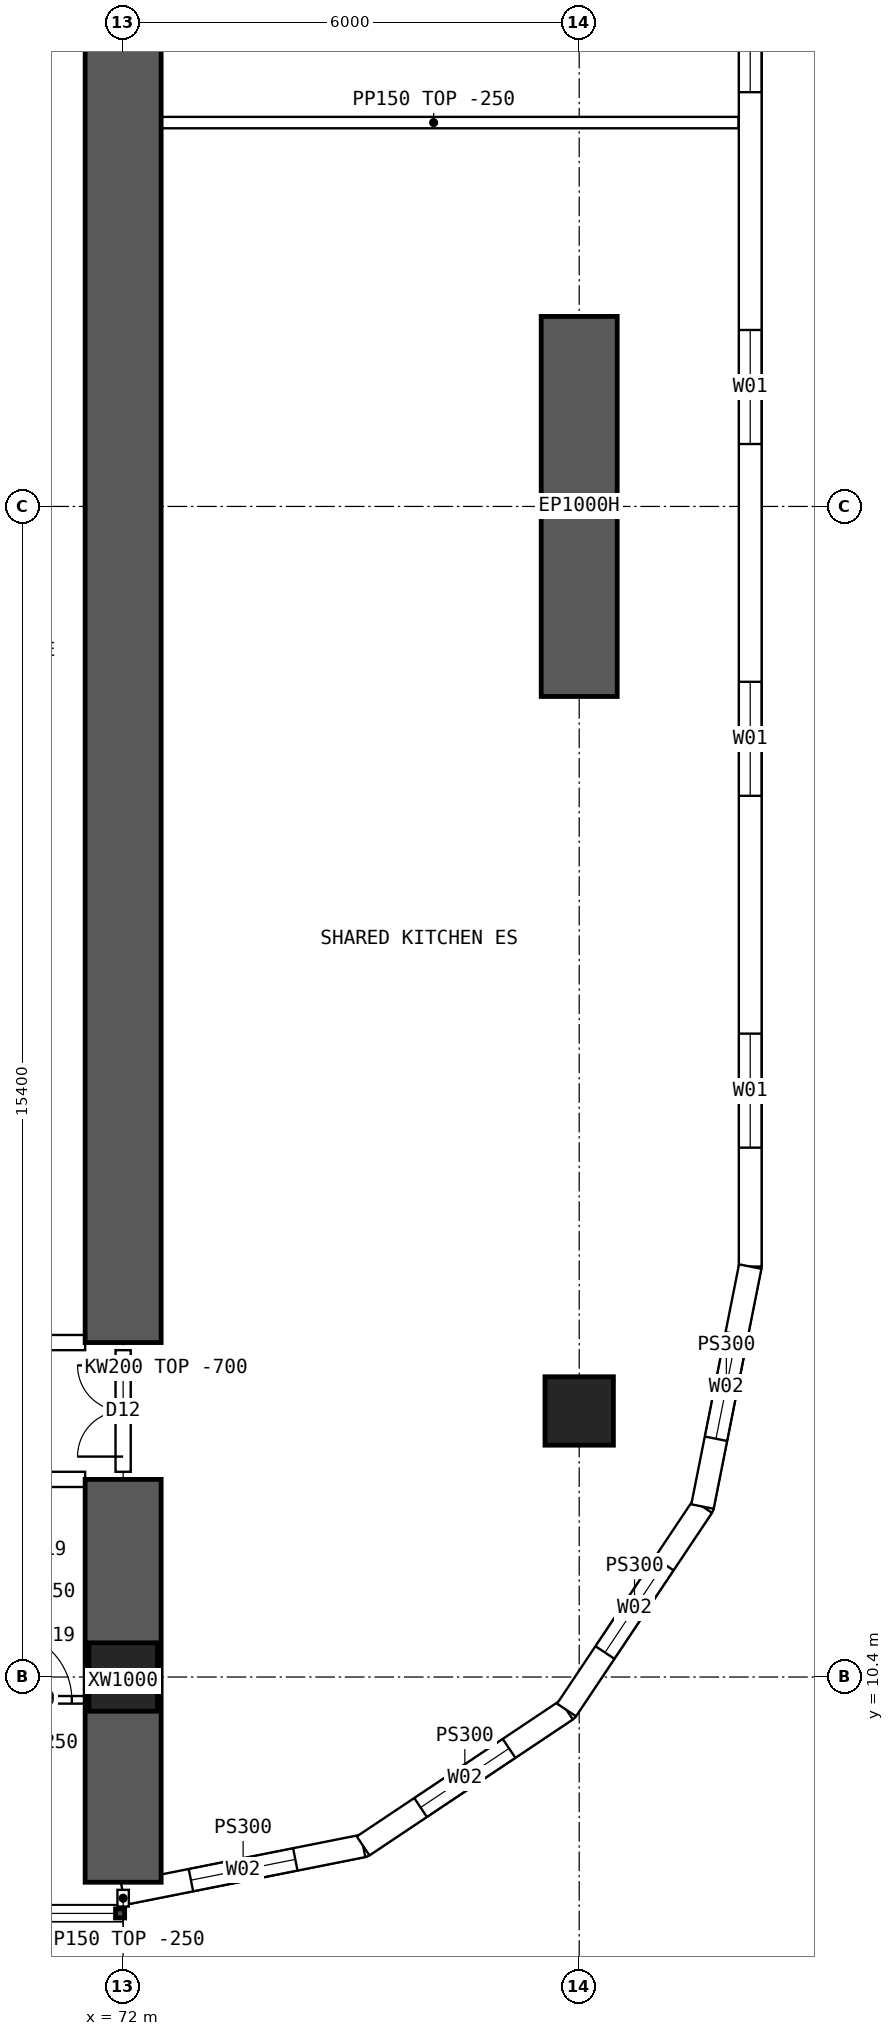
"""IFC4 building model, lengths in metres.
Left out: names, types, materials, properties, quantities, classifications, styles, units other than length and angle.
Written with IfcOpenShell. Run it as: python <this file> out.ifc"""

import sys

from ifc_helpers import new_model, si_unit, direction, frame, frame_2d, origin, origin_2d, place, context, subcontext, project, spatial, polyline, rectangle, hollow_rectangle, outline, extrude, element, fill, save


model = new_model("IFC4")
c1 = context("Model", 3, precision=1e-05, world=origin(), true_north=direction((0.0, 1.0)))
c2 = subcontext(c1, "Body", "Model", "MODEL_VIEW")
j1 = project(units=[si_unit("LENGTHUNIT", "METRE"), si_unit("PLANEANGLEUNIT", "RADIAN")], contexts=[c1])
p1 = place(None, origin())
s1 = spatial("IfcSite", under=j1, at=p1, CompositionType="ELEMENT")
p2 = place(p1, origin())
s2 = spatial("IfcBuilding", under=s1, at=p2, CompositionType="ELEMENT")
p3 = place(p2, frame((0.0, 0.0, 46.45)))
s3 = spatial("IfcBuildingStorey", under=s2, at=p3, CompositionType="ELEMENT", Elevation=46.45)
for number, where, z_axis, x_axis in (
    (1, (72.0, 10.4, 0.0), (0.0, 0.0, 1.0), (1.0, 0.0, 0.0)),
    (2, (78.0, 13.9, 0.0), (0.0, 0.0, 1.0), (1.0, 0.0, 0.0)),
):
    element("IfcColumn", number, at=place(p3, frame(where, z_axis=z_axis, x_axis=x_axis)), inside=s3, PredefinedType="COLUMN", context=c2, shape_type="SweptSolid", body=[
        extrude(hollow_rectangle(XDim=0.9, YDim=0.9, WallThickness=0.09, at=origin_2d()), origin(), (0.0, 0.0, 1.0), 3.75),
    ])
p4 = place(p3, frame((78.0, 23.3, 0.0), z_axis=(0.0, 0.0, 1.0), x_axis=(0.0, 1.0, 0.0)))
e3 = element("IfcWall", 3, at=p4, inside=s3, PredefinedType="SHEAR", context=c2, shape_type="SweptSolid", body=[
    extrude(rectangle(XDim=5.0, YDim=1.0, at=frame_2d((2.5, 0.0))), origin(), (0.0, 0.0, 1.0), 3.75),
])
p5 = place(p3, frame((72.0, 7.7, 0.0), z_axis=(0.0, 0.0, 1.0), x_axis=(0.0, 1.0, 0.0)))
e4 = element("IfcWall", 4, at=p5, inside=s3, PredefinedType="SHEAR", context=c2, shape_type="SweptSolid", body=[
    extrude(rectangle(XDim=5.3, YDim=1.0, at=frame_2d((2.65, 0.0))), origin(), (0.0, 0.0, 1.0), 3.75),
])
p6 = place(p3, frame((72.0, 14.8, 0.0), z_axis=(0.0, 0.0, 1.0), x_axis=(0.0, 1.0, 0.0)))
e5 = element("IfcWall", 5, at=p6, inside=s3, PredefinedType="SHEAR", context=c2, shape_type="SweptSolid", body=[
    extrude(rectangle(XDim=34.4, YDim=1.0, at=frame_2d((17.2, 0.0))), origin(), (0.0, 0.0, 1.0), 3.75),
])
p7 = place(p3, frame((80.25, 15.8, 0.0), z_axis=(0.0, 0.0, 1.0), x_axis=(0.0, 1.0, 0.0)))
e6 = element("IfcWall", 6, at=p7, inside=s3, PredefinedType="SOLIDWALL", context=c2, shape_type="SweptSolid", body=[
    extrude(outline(polyline([(-0.015, -0.15), (32.415, -0.15), (32.385, 0.15), (0.015, 0.15), (-0.015, -0.15)])), origin(), (0.0, 0.0, 1.0), 3.5),
])
p8 = place(p7, frame((1.564, 0.0, 0.9)))
e7 = element("IfcOpeningElement", 7, at=p8, cuts=e6, PredefinedType="OPENING", context=c2, shape_type="SweptSolid", body=[
    extrude(rectangle(XDim=1.5, YDim=2.0, at=frame_2d((0.75, 1.0))), frame((0.0, 0.16, 0.0), z_axis=(0.0, -1.0, 0.0), x_axis=(1.0, 0.0, 0.0)), (0.0, 0.0, 1.0), 0.32),
])
p9 = place(p7, frame((6.193, 0.0, 0.9)))
e8 = element("IfcOpeningElement", 8, at=p9, cuts=e6, PredefinedType="OPENING", context=c2, shape_type="SweptSolid", body=[
    extrude(rectangle(XDim=1.5, YDim=2.0, at=frame_2d((0.75, 1.0))), frame((0.0, 0.16, 0.0), z_axis=(0.0, -1.0, 0.0), x_axis=(1.0, 0.0, 0.0)), (0.0, 0.0, 1.0), 0.32),
])
p10 = place(p7, frame((10.822, 0.0, 0.9)))
e9 = element("IfcOpeningElement", 9, at=p10, cuts=e6, PredefinedType="OPENING", context=c2, shape_type="SweptSolid", body=[
    extrude(rectangle(XDim=1.5, YDim=2.0, at=frame_2d((0.75, 1.0))), frame((0.0, 0.16, 0.0), z_axis=(0.0, -1.0, 0.0), x_axis=(1.0, 0.0, 0.0)), (0.0, 0.0, 1.0), 0.32),
])
p11 = place(p7, frame((15.45, 0.0, 0.9)))
e10 = element("IfcOpeningElement", 10, at=p11, cuts=e6, PredefinedType="OPENING", context=c2, shape_type="SweptSolid", body=[
    extrude(rectangle(XDim=1.5, YDim=2.0, at=frame_2d((0.75, 1.0))), frame((0.0, 0.16, 0.0), z_axis=(0.0, -1.0, 0.0), x_axis=(1.0, 0.0, 0.0)), (0.0, 0.0, 1.0), 0.32),
])
p12 = place(p7, frame((20.079, 0.0, 0.9)))
e11 = element("IfcOpeningElement", 11, at=p12, cuts=e6, PredefinedType="OPENING", context=c2, shape_type="SweptSolid", body=[
    extrude(rectangle(XDim=1.5, YDim=2.0, at=frame_2d((0.75, 1.0))), frame((0.0, 0.16, 0.0), z_axis=(0.0, -1.0, 0.0), x_axis=(1.0, 0.0, 0.0)), (0.0, 0.0, 1.0), 0.32),
])
p13 = place(p7, frame((24.707, 0.0, 0.9)))
e12 = element("IfcOpeningElement", 12, at=p13, cuts=e6, PredefinedType="OPENING", context=c2, shape_type="SweptSolid", body=[
    extrude(rectangle(XDim=1.5, YDim=2.0, at=frame_2d((0.75, 1.0))), frame((0.0, 0.16, 0.0), z_axis=(0.0, -1.0, 0.0), x_axis=(1.0, 0.0, 0.0)), (0.0, 0.0, 1.0), 0.32),
])
p14 = place(p7, frame((29.336, 0.0, 0.9)))
e13 = element("IfcOpeningElement", 13, at=p14, cuts=e6, PredefinedType="OPENING", context=c2, shape_type="SweptSolid", body=[
    extrude(rectangle(XDim=1.5, YDim=2.0, at=frame_2d((0.75, 1.0))), frame((0.0, 0.16, 0.0), z_axis=(0.0, -1.0, 0.0), x_axis=(1.0, 0.0, 0.0)), (0.0, 0.0, 1.0), 0.32),
])
p15 = place(p3, frame((72.0, 7.55, 0.0), z_axis=(0.0, 0.0, 1.0), x_axis=(0.980787251524, 0.195080412259, 0.0)))
e14 = element("IfcWall", 14, at=p15, inside=s3, PredefinedType="SOLIDWALL", context=c2, shape_type="SweptSolid", body=[
    extrude(outline(polyline([(-0.03, -0.15), (3.249, -0.15), (3.189, 0.15), (0.03, 0.15), (-0.03, -0.15)])), origin(), (0.0, 0.0, 1.0), 3.5),
])
p16 = place(p15, frame((0.909, 0.0, 0.9)))
e15 = element("IfcOpeningElement", 15, at=p16, cuts=e14, PredefinedType="OPENING", context=c2, shape_type="SweptSolid", body=[
    extrude(rectangle(XDim=1.4, YDim=1.8, at=frame_2d((0.7, 0.9))), frame((0.0, 0.16, 0.0), z_axis=(0.0, -1.0, 0.0), x_axis=(1.0, 0.0, 0.0)), (0.0, 0.0, 1.0), 0.32),
])
p17 = place(p3, frame((75.157, 8.178, 0.0), z_axis=(0.0, 0.0, 1.0), x_axis=(0.831478105043, 0.555557522525, 0.0)))
e16 = element("IfcWall", 16, at=p17, inside=s3, PredefinedType="SOLIDWALL", context=c2, shape_type="SweptSolid", body=[
    extrude(outline(polyline([(-0.03, -0.15), (3.249, -0.15), (3.189, 0.15), (0.03, 0.15), (-0.03, -0.15)])), origin(), (0.0, 0.0, 1.0), 3.5),
])
p18 = place(p17, frame((0.909, 0.0, 0.9)))
e17 = element("IfcOpeningElement", 17, at=p18, cuts=e16, PredefinedType="OPENING", context=c2, shape_type="SweptSolid", body=[
    extrude(rectangle(XDim=1.4, YDim=1.8, at=frame_2d((0.7, 0.9))), frame((0.0, 0.16, 0.0), z_axis=(0.0, -1.0, 0.0), x_axis=(1.0, 0.0, 0.0)), (0.0, 0.0, 1.0), 0.32),
])
p19 = place(p3, frame((77.833, 9.966, 0.0), z_axis=(0.0, 0.0, 1.0), x_axis=(0.555609954424, 0.831443069936, 0.0)))
e18 = element("IfcWall", 18, at=p19, inside=s3, PredefinedType="SOLIDWALL", context=c2, shape_type="SweptSolid", body=[
    extrude(outline(polyline([(-0.03, -0.15), (3.249, -0.15), (3.189, 0.15), (0.03, 0.15), (-0.03, -0.15)])), origin(), (0.0, 0.0, 1.0), 3.5),
])
p20 = place(p19, frame((0.909, 0.0, 0.9)))
e19 = element("IfcOpeningElement", 19, at=p20, cuts=e18, PredefinedType="OPENING", context=c2, shape_type="SweptSolid", body=[
    extrude(rectangle(XDim=1.4, YDim=1.8, at=frame_2d((0.7, 0.9))), frame((0.0, 0.16, 0.0), z_axis=(0.0, -1.0, 0.0), x_axis=(1.0, 0.0, 0.0)), (0.0, 0.0, 1.0), 0.32),
])
p21 = place(p3, frame((79.622, 12.643, 0.0), z_axis=(0.0, 0.0, 1.0), x_axis=(0.195065901187, 0.980790137692, 0.0)))
e20 = element("IfcWall", 20, at=p21, inside=s3, PredefinedType="SOLIDWALL", context=c2, shape_type="SweptSolid", body=[
    extrude(outline(polyline([(-0.03, -0.15), (3.234, -0.15), (3.204, 0.15), (0.03, 0.15), (-0.03, -0.15)])), origin(), (0.0, 0.0, 1.0), 3.5),
])
p22 = place(p21, frame((0.909, 0.0, 0.9)))
e21 = element("IfcOpeningElement", 21, at=p22, cuts=e20, PredefinedType="OPENING", context=c2, shape_type="SweptSolid", body=[
    extrude(rectangle(XDim=1.4, YDim=1.8, at=frame_2d((0.7, 0.9))), frame((0.0, 0.16, 0.0), z_axis=(0.0, -1.0, 0.0), x_axis=(1.0, 0.0, 0.0)), (0.0, 0.0, 1.0), 0.32),
])
p23 = place(p3, frame((66.5, 13.0, 0.0), z_axis=(0.0, 0.0, 1.0), x_axis=(1.0, 0.0, 0.0)))
e22 = element("IfcWall", 22, at=p23, inside=s3, PredefinedType="SOLIDWALL", context=c2, shape_type="SweptSolid", body=[
    extrude(outline(polyline([(0.0, 0.0), (5.0, 0.0), (5.0, 3.1), (0.0, 3.1), (0.0, 0.0)])), frame((0.0, 0.1, 0.0), z_axis=(0.0, -1.0, 0.0), x_axis=(1.0, 0.0, 0.0)), (0.0, 0.0, 1.0), 0.2),
])
p24 = place(p23, frame((1.3, 0.0, 0.0)))
e23 = element("IfcOpeningElement", 23, at=p24, cuts=e22, PredefinedType="OPENING", context=c2, shape_type="SweptSolid", body=[
    extrude(rectangle(XDim=0.9, YDim=2.1, at=frame_2d((0.45, 1.05))), frame((0.0, 0.11, 0.0), z_axis=(0.0, -1.0, 0.0), x_axis=(1.0, 0.0, 0.0)), (0.0, 0.0, 1.0), 0.22),
])
p25 = place(p23, frame((2.675, 0.0, 0.0)))
e24 = element("IfcOpeningElement", 24, at=p25, cuts=e22, PredefinedType="OPENING", context=c2, shape_type="SweptSolid", body=[
    extrude(rectangle(XDim=0.9, YDim=2.1, at=frame_2d((0.45, 1.05))), frame((0.0, 0.11, 0.0), z_axis=(0.0, -1.0, 0.0), x_axis=(1.0, 0.0, 0.0)), (0.0, 0.0, 1.0), 0.22),
])
p26 = place(p3, frame((66.5, 14.8, 0.0), z_axis=(0.0, 0.0, 1.0), x_axis=(1.0, 0.0, 0.0)))
e25 = element("IfcWall", 25, at=p26, inside=s3, PredefinedType="SOLIDWALL", context=c2, shape_type="SweptSolid", body=[
    extrude(rectangle(XDim=5.0, YDim=0.2, at=frame_2d((2.5, 0.0))), origin(), (0.0, 0.0, 1.0), 3.5),
])
p27 = place(p26, frame((0.2, 0.0, 0.0)))
e26 = element("IfcOpeningElement", 26, at=p27, cuts=e25, PredefinedType="OPENING", context=c2, shape_type="SweptSolid", body=[
    extrude(rectangle(XDim=1.6, YDim=2.1, at=frame_2d((0.8, 1.05))), frame((0.0, 0.11, 0.0), z_axis=(0.0, -1.0, 0.0), x_axis=(1.0, 0.0, 0.0)), (0.0, 0.0, 1.0), 0.22),
])
p28 = place(p3, frame((71.55, 10.1, 0.0), z_axis=(0.0, 0.0, 1.0), x_axis=(-1.0, 0.0, 0.0)))
e27 = element("IfcWall", 27, at=p28, inside=s3, PredefinedType="PARTITIONING", context=c2, shape_type="SweptSolid", body=[
    extrude(rectangle(XDim=1.3, YDim=0.1, at=frame_2d((0.65, 0.0))), origin(), (0.0, 0.0, 1.0), 3.5),
])
p29 = place(p28, frame((0.225, 0.0, 0.0)))
e28 = element("IfcOpeningElement", 28, at=p29, cuts=e27, PredefinedType="OPENING", context=c2, shape_type="SweptSolid", body=[
    extrude(rectangle(XDim=0.9, YDim=2.1, at=frame_2d((0.45, 1.05))), frame((0.0, 0.06, 0.0), z_axis=(0.0, -1.0, 0.0), x_axis=(1.0, 0.0, 0.0)), (0.0, 0.0, 1.0), 0.12),
])
p30 = place(p3, frame((72.075, 30.85, 0.0), z_axis=(0.0, 0.0, 1.0), x_axis=(1.0, 0.0, 0.0)))
e29 = element("IfcWall", 29, at=p30, inside=s3, PredefinedType="PARTITIONING", context=c2, shape_type="SweptSolid", body=[
    extrude(outline(polyline([(0.0, 0.0), (8.02, 0.0), (8.02, 3.5), (6.227, 3.5), (6.225, 3.05), (5.627, 3.05), (5.625, 3.5), (0.0, 3.5), (0.0, 0.0)])), frame((0.0, 0.075, 0.0), z_axis=(0.0, -1.0, 0.0), x_axis=(1.0, 0.0, 0.0)), (0.0, 0.0, 1.0), 0.15),
])
p31 = place(p3, frame((72.0, 13.1, 0.0), z_axis=(0.0, 0.0, 1.0), x_axis=(0.0, 1.0, 0.0)))
e30 = element("IfcWall", 30, at=p31, inside=s3, PredefinedType="SOLIDWALL", context=c2, shape_type="SweptSolid", body=[
    extrude(outline(polyline([(0.0, 0.0), (1.6, 0.0), (1.6, 3.05), (0.0, 3.05), (0.0, 0.0)])), frame((0.0, 0.1, 0.0), z_axis=(0.0, -1.0, 0.0), x_axis=(1.0, 0.0, 0.0)), (0.0, 0.0, 1.0), 0.2),
])
p32 = place(p31, frame((0.2, 0.0, 0.0)))
e31 = element("IfcOpeningElement", 31, at=p32, cuts=e30, PredefinedType="OPENING", context=c2, shape_type="SweptSolid", body=[
    extrude(rectangle(XDim=1.2, YDim=2.1, at=frame_2d((0.6, 1.05))), frame((0.0, 0.11, 0.0), z_axis=(0.0, -1.0, 0.0), x_axis=(1.0, 0.0, 0.0)), (0.0, 0.0, 1.0), 0.22),
])
p33 = place(p3, frame((72.0, 7.6, 0.0), z_axis=(0.0, 0.0, 1.0), x_axis=(0.0, -1.0, 0.0)))
e32 = element("IfcWall", 32, at=p33, inside=s3, PredefinedType="PARTITIONING", context=c2, shape_type="SweptSolid", body=[
    extrude(rectangle(XDim=0.22, YDim=0.15, at=frame_2d((0.11, 0.0))), origin(), (0.0, 0.0, 1.0), 3.5),
])
p34 = place(p8, origin())
e33 = element("IfcWindow", 33, at=p34, inside=s3, PartitioningType="SINGLE_PANEL", PredefinedType="WINDOW", context=c2, shape_type="SweptSolid", body=[
    extrude(rectangle(XDim=1.5, YDim=2.0, at=frame_2d((0.75, 1.0))), frame((0.0, 0.03, 0.0), z_axis=(0.0, -1.0, 0.0), x_axis=(1.0, 0.0, 0.0)), (0.0, 0.0, 1.0), 0.06),
])
fill(e7, e33)
p35 = place(p9, origin())
e34 = element("IfcWindow", 34, at=p35, inside=s3, PartitioningType="SINGLE_PANEL", PredefinedType="WINDOW", context=c2, shape_type="SweptSolid", body=[
    extrude(rectangle(XDim=1.5, YDim=2.0, at=frame_2d((0.75, 1.0))), frame((0.0, 0.03, 0.0), z_axis=(0.0, -1.0, 0.0), x_axis=(1.0, 0.0, 0.0)), (0.0, 0.0, 1.0), 0.06),
])
fill(e8, e34)
p36 = place(p10, origin())
e35 = element("IfcWindow", 35, at=p36, inside=s3, PartitioningType="SINGLE_PANEL", PredefinedType="WINDOW", context=c2, shape_type="SweptSolid", body=[
    extrude(rectangle(XDim=1.5, YDim=2.0, at=frame_2d((0.75, 1.0))), frame((0.0, 0.03, 0.0), z_axis=(0.0, -1.0, 0.0), x_axis=(1.0, 0.0, 0.0)), (0.0, 0.0, 1.0), 0.06),
])
fill(e9, e35)
p37 = place(p11, origin())
e36 = element("IfcWindow", 36, at=p37, inside=s3, PartitioningType="SINGLE_PANEL", PredefinedType="WINDOW", context=c2, shape_type="SweptSolid", body=[
    extrude(rectangle(XDim=1.5, YDim=2.0, at=frame_2d((0.75, 1.0))), frame((0.0, 0.03, 0.0), z_axis=(0.0, -1.0, 0.0), x_axis=(1.0, 0.0, 0.0)), (0.0, 0.0, 1.0), 0.06),
])
fill(e10, e36)
p38 = place(p16, origin())
e37 = element("IfcWindow", 37, at=p38, inside=s3, PartitioningType="SINGLE_PANEL", PredefinedType="WINDOW", context=c2, shape_type="SweptSolid", body=[
    extrude(rectangle(XDim=1.4, YDim=1.8, at=frame_2d((0.7, 0.9))), frame((0.0, 0.03, 0.0), z_axis=(0.0, -1.0, 0.0), x_axis=(1.0, 0.0, 0.0)), (0.0, 0.0, 1.0), 0.06),
])
fill(e15, e37)
p39 = place(p18, origin())
e38 = element("IfcWindow", 38, at=p39, inside=s3, PartitioningType="SINGLE_PANEL", PredefinedType="WINDOW", context=c2, shape_type="SweptSolid", body=[
    extrude(rectangle(XDim=1.4, YDim=1.8, at=frame_2d((0.7, 0.9))), frame((0.0, 0.03, 0.0), z_axis=(0.0, -1.0, 0.0), x_axis=(1.0, 0.0, 0.0)), (0.0, 0.0, 1.0), 0.06),
])
fill(e17, e38)
p40 = place(p20, origin())
e39 = element("IfcWindow", 39, at=p40, inside=s3, PartitioningType="SINGLE_PANEL", PredefinedType="WINDOW", context=c2, shape_type="SweptSolid", body=[
    extrude(rectangle(XDim=1.4, YDim=1.8, at=frame_2d((0.7, 0.9))), frame((0.0, 0.03, 0.0), z_axis=(0.0, -1.0, 0.0), x_axis=(1.0, 0.0, 0.0)), (0.0, 0.0, 1.0), 0.06),
])
fill(e19, e39)
p41 = place(p22, origin())
e40 = element("IfcWindow", 40, at=p41, inside=s3, PartitioningType="SINGLE_PANEL", PredefinedType="WINDOW", context=c2, shape_type="SweptSolid", body=[
    extrude(rectangle(XDim=1.4, YDim=1.8, at=frame_2d((0.7, 0.9))), frame((0.0, 0.03, 0.0), z_axis=(0.0, -1.0, 0.0), x_axis=(1.0, 0.0, 0.0)), (0.0, 0.0, 1.0), 0.06),
])
fill(e21, e40)
p42 = place(p29, origin())
e41 = element("IfcDoor", 41, at=p42, inside=s3, OperationType="SINGLE_SWING_RIGHT", PredefinedType="DOOR", context=c2, shape_type="SweptSolid", body=[
    extrude(rectangle(XDim=0.9, YDim=2.1, at=frame_2d((0.45, 1.05))), frame((0.0, 0.025, 0.0), z_axis=(0.0, -1.0, 0.0), x_axis=(1.0, 0.0, 0.0)), (0.0, 0.0, 1.0), 0.05),
])
fill(e28, e41)
p43 = place(p32, origin())
e42 = element("IfcDoor", 42, at=p43, inside=s3, OperationType="DOUBLE_DOOR_SINGLE_SWING", PredefinedType="DOOR", context=c2, shape_type="SweptSolid", body=[
    extrude(rectangle(XDim=1.2, YDim=2.1, at=frame_2d((0.6, 1.05))), frame((0.0, 0.025, 0.0), z_axis=(0.0, -1.0, 0.0), x_axis=(1.0, 0.0, 0.0)), (0.0, 0.0, 1.0), 0.05),
])
fill(e31, e42)
save(model, sys.argv[1])
